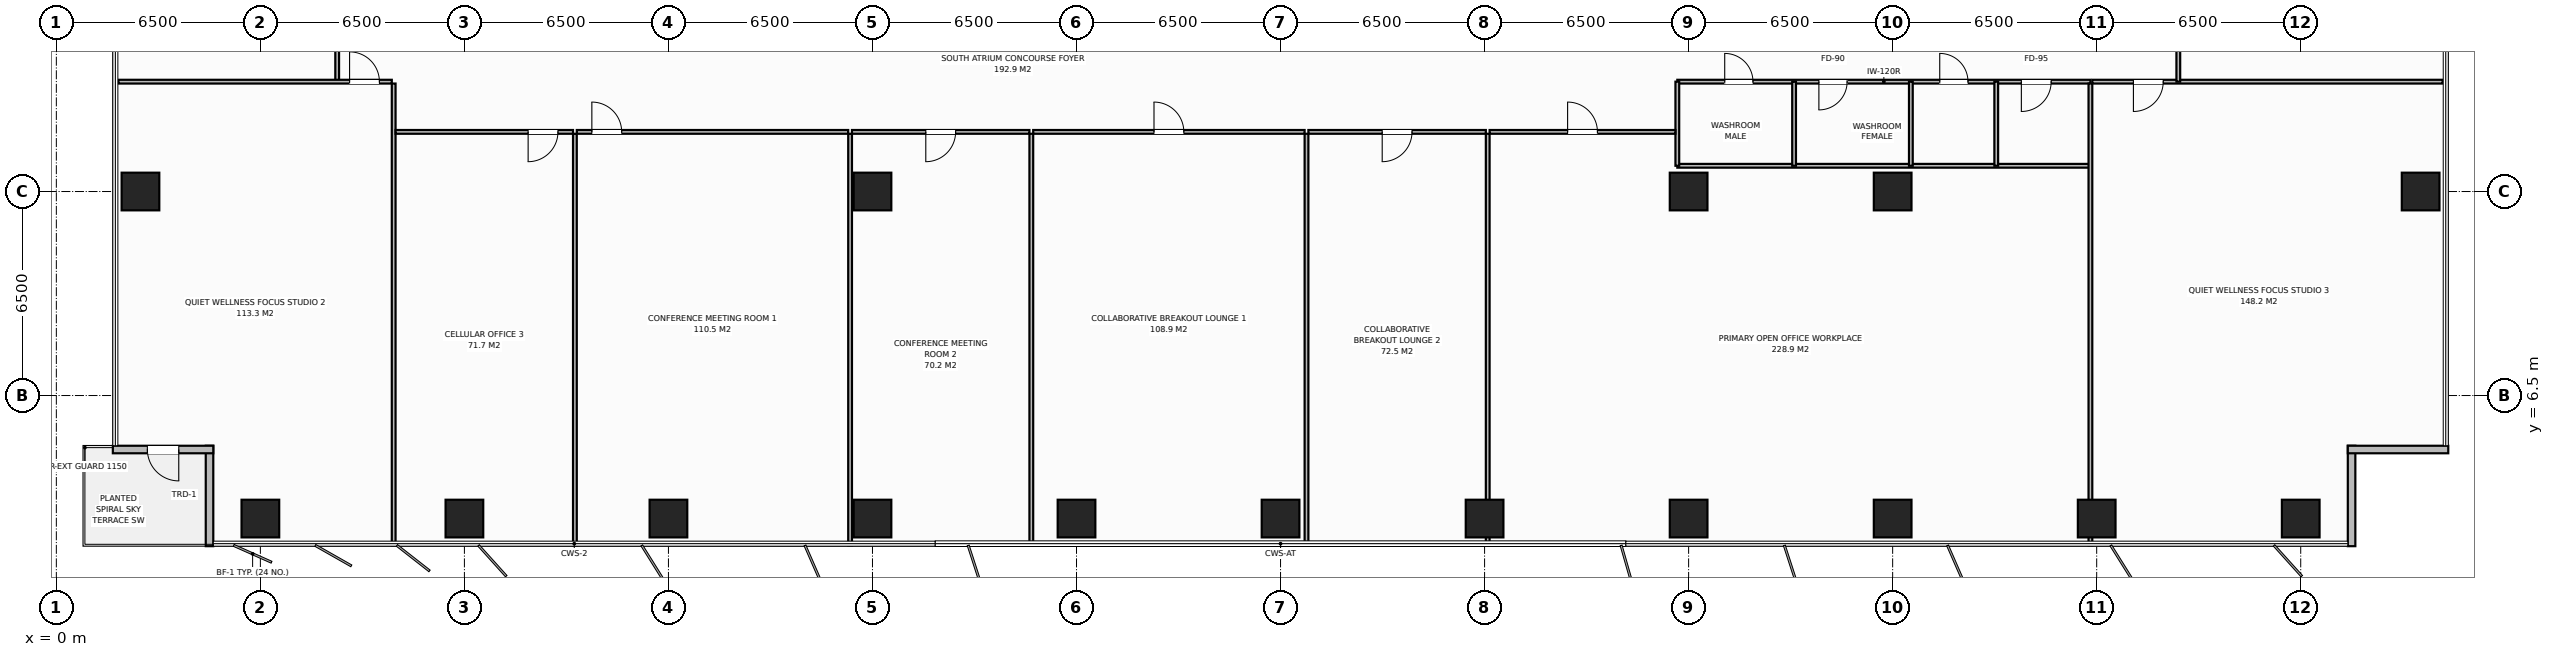
"""IFC4 building model, lengths in metres.
Left out: names, types, materials, properties, quantities, classifications, styles, units other than length and angle.
Written with IfcOpenShell. Run it as: python <this file> out.ifc"""

import sys

from ifc_helpers import new_model, si_unit, direction, frame, frame_2d, origin, origin_2d, place, context, subcontext, project, spatial, rectangle, extrude, element, fill, save


model = new_model("IFC4")
c1 = context("Model", 3, precision=1e-05, world=origin(), true_north=direction((0.0, 1.0)))
c2 = subcontext(c1, "Body", "Model", "MODEL_VIEW")
j1 = project(units=[si_unit("LENGTHUNIT", "METRE"), si_unit("PLANEANGLEUNIT", "RADIAN")], contexts=[c1])
p1 = place(None, origin())
s1 = spatial("IfcSite", under=j1, at=p1, CompositionType="ELEMENT")
p2 = place(p1, origin())
s2 = spatial("IfcBuilding", under=s1, at=p2, CompositionType="ELEMENT")
p3 = place(p2, frame((0.0, 0.0, 93.6)))
s3 = spatial("IfcBuildingStorey", under=s2, at=p3, CompositionType="ELEMENT", Elevation=93.6)
for number, where, z_axis, x_axis in (
    (1, (58.5, 13.0, 0.0), (0.0, 0.0, 1.0), (1.0, 0.0, 0.0)),
    (2, (26.0, 13.0, 0.0), (0.0, 0.0, 1.0), (1.0, 0.0, 0.0)),
    (3, (52.0, 13.0, 0.0), (0.0, 0.0, 1.0), (1.0, 0.0, 0.0)),
    (4, (6.5, 2.58, 0.0), (0.0, 0.0, 1.0), (1.0, 0.0, 0.0)),
    (5, (13.0, 2.58, 0.0), (0.0, 0.0, 1.0), (1.0, 0.0, 0.0)),
    (6, (19.5, 2.58, 0.0), (0.0, 0.0, 1.0), (1.0, 0.0, 0.0)),
    (7, (26.0, 2.58, 0.0), (0.0, 0.0, 1.0), (1.0, 0.0, 0.0)),
    (8, (32.5, 2.58, 0.0), (0.0, 0.0, 1.0), (1.0, 0.0, 0.0)),
    (9, (39.0, 2.58, 0.0), (0.0, 0.0, 1.0), (1.0, 0.0, 0.0)),
    (10, (45.5, 2.58, 0.0), (0.0, 0.0, 1.0), (1.0, 0.0, 0.0)),
    (11, (52.0, 2.58, 0.0), (0.0, 0.0, 1.0), (1.0, 0.0, 0.0)),
    (12, (58.5, 2.58, 0.0), (0.0, 0.0, 1.0), (1.0, 0.0, 0.0)),
    (13, (65.0, 2.58, 0.0), (0.0, 0.0, 1.0), (1.0, 0.0, 0.0)),
    (14, (71.5, 2.58, 0.0), (0.0, 0.0, 1.0), (1.0, 0.0, 0.0)),
    (15, (2.68, 13.0, 0.0), (0.0, 0.0, 1.0), (1.0, 0.0, 0.0)),
    (16, (75.32, 13.0, 0.0), (0.0, 0.0, 1.0), (1.0, 0.0, 0.0)),
):
    element("IfcColumn", number, at=place(p3, frame(where, z_axis=z_axis, x_axis=x_axis)), inside=s3, PredefinedType="COLUMN", context=c2, shape_type="SweptSolid", body=[
        extrude(rectangle(XDim=1.2, YDim=1.2, at=origin_2d()), origin(), (0.0, 0.0, 1.0), 3.8),
    ])
p4 = place(p3, frame((4.88, 1.7, 0.0), z_axis=(0.0, 0.0, 1.0), x_axis=(0.0, 1.0, 0.0)))
e17 = element("IfcWall", 17, at=p4, inside=s3, PredefinedType="STANDARD", context=c2, shape_type="SweptSolid", body=[
    extrude(rectangle(XDim=3.2, YDim=0.24, at=frame_2d((1.6, 0.0))), origin(), (0.0, 0.0, 1.0), 3.565),
])
p5 = place(p3, frame((5.0, 4.78, 0.0), z_axis=(0.0, 0.0, 1.0), x_axis=(-1.0, 0.0, 0.0)))
e18 = element("IfcWall", 18, at=p5, inside=s3, PredefinedType="STANDARD", context=c2, shape_type="SweptSolid", body=[
    extrude(rectangle(XDim=3.2, YDim=0.24, at=frame_2d((1.6, 0.0))), origin(), (0.0, 0.0, 1.0), 3.565),
])
p6 = place(p5, frame((1.1, 0.0, 0.0)))
e19 = element("IfcOpeningElement", 19, at=p6, cuts=e18, PredefinedType="OPENING", context=c2, shape_type="SweptSolid", body=[
    extrude(rectangle(XDim=1.0, YDim=2.2, at=frame_2d((0.5, 1.1))), frame((0.0, 0.13, 0.0), z_axis=(0.0, -1.0, 0.0), x_axis=(1.0, 0.0, 0.0)), (0.0, 0.0, 1.0), 0.26),
])
for number, where, z_axis, x_axis in (
    (20, (73.12, 4.9, 0.0), (0.0, 0.0, 1.0), (0.0, -1.0, 0.0)),
    (21, (76.2, 4.78, 0.0), (0.0, 0.0, 1.0), (-1.0, 0.0, 0.0)),
):
    element("IfcWall", number, at=place(p3, frame(where, z_axis=z_axis, x_axis=x_axis)), inside=s3, PredefinedType="STANDARD", context=c2, shape_type="SweptSolid", body=[
        extrude(rectangle(XDim=3.2, YDim=0.24, at=frame_2d((1.6, 0.0))), origin(), (0.0, 0.0, 1.0), 3.565),
    ])
p7 = place(p3, frame((8.947, 16.5, 0.0), z_axis=(0.0, 0.0, 1.0), x_axis=(0.0, 1.0, 0.0)))
e22 = element("IfcWall", 22, at=p7, inside=s3, PredefinedType="PARTITIONING", context=c2, shape_type="SweptSolid", body=[
    extrude(rectangle(XDim=2.1, YDim=0.12, at=frame_2d((1.05, 0.0))), origin(), (0.0, 0.0, 1.0), 3.565),
])
p8 = place(p3, frame((51.64, 16.5, 0.0), z_axis=(0.0, 0.0, 1.0), x_axis=(1.0, 0.0, 0.0)))
e23 = element("IfcWall", 23, at=p8, inside=s3, PredefinedType="PARTITIONING", context=c2, shape_type="SweptSolid", body=[
    extrude(rectangle(XDim=13.16, YDim=0.12, at=frame_2d((6.58, 0.0))), origin(), (0.0, 0.0, 1.0), 3.565),
])
p9 = place(p8, frame((1.51, 0.0, 0.0)))
e24 = element("IfcOpeningElement", 24, at=p9, cuts=e23, PredefinedType="OPENING", context=c2, shape_type="SweptSolid", body=[
    extrude(rectangle(XDim=0.9, YDim=2.15, at=frame_2d((0.45, 1.075))), frame((0.0, 0.07, 0.0), z_axis=(0.0, -1.0, 0.0), x_axis=(1.0, 0.0, 0.0)), (0.0, 0.0, 1.0), 0.14),
])
p10 = place(p8, frame((4.51, 0.0, 0.0)))
e25 = element("IfcOpeningElement", 25, at=p10, cuts=e23, PredefinedType="OPENING", context=c2, shape_type="SweptSolid", body=[
    extrude(rectangle(XDim=0.9, YDim=2.15, at=frame_2d((0.45, 1.075))), frame((0.0, 0.07, 0.0), z_axis=(0.0, -1.0, 0.0), x_axis=(1.0, 0.0, 0.0)), (0.0, 0.0, 1.0), 0.14),
])
p11 = place(p8, frame((8.36, 0.0, 0.0)))
e26 = element("IfcOpeningElement", 26, at=p11, cuts=e23, PredefinedType="OPENING", context=c2, shape_type="SweptSolid", body=[
    extrude(rectangle(XDim=0.9, YDim=2.15, at=frame_2d((0.45, 1.075))), frame((0.0, 0.07, 0.0), z_axis=(0.0, -1.0, 0.0), x_axis=(1.0, 0.0, 0.0)), (0.0, 0.0, 1.0), 0.14),
])
p12 = place(p8, frame((10.96, 0.0, 0.0)))
e27 = element("IfcOpeningElement", 27, at=p12, cuts=e23, PredefinedType="OPENING", context=c2, shape_type="SweptSolid", body=[
    extrude(rectangle(XDim=0.95, YDim=2.15, at=frame_2d((0.475, 1.075))), frame((0.0, 0.07, 0.0), z_axis=(0.0, -1.0, 0.0), x_axis=(1.0, 0.0, 0.0)), (0.0, 0.0, 1.0), 0.14),
])
p13 = place(p3, frame((51.64, 13.82, 0.0), z_axis=(0.0, 0.0, 1.0), x_axis=(1.0, 0.0, 0.0)))
e28 = element("IfcWall", 28, at=p13, inside=s3, PredefinedType="PARTITIONING", context=c2, shape_type="SweptSolid", body=[
    extrude(rectangle(XDim=13.16, YDim=0.12, at=frame_2d((6.58, 0.0))), origin(), (0.0, 0.0, 1.0), 3.565),
])
for number, where, z_axis, x_axis in (
    (29, (51.64, 13.82, 0.0), (0.0, 0.0, 1.0), (0.0, 1.0, 0.0)),
    (30, (55.36, 13.82, 0.0), (0.0, 0.0, 1.0), (0.0, 1.0, 0.0)),
    (31, (59.08, 13.82, 0.0), (0.0, 0.0, 1.0), (0.0, 1.0, 0.0)),
    (32, (61.8, 13.82, 0.0), (0.0, 0.0, 1.0), (0.0, 1.0, 0.0)),
):
    element("IfcWall", number, at=place(p3, frame(where, z_axis=z_axis, x_axis=x_axis)), inside=s3, PredefinedType="PARTITIONING", context=c2, shape_type="SweptSolid", body=[
        extrude(rectangle(XDim=2.68, YDim=0.12, at=frame_2d((1.34, 0.0))), origin(), (0.0, 0.0, 1.0), 3.565),
    ])
p14 = place(p3, frame((10.747, 1.72, 0.0), z_axis=(0.0, 0.0, 1.0), x_axis=(0.0, 1.0, 0.0)))
e33 = element("IfcWall", 33, at=p14, inside=s3, PredefinedType="PARTITIONING", context=c2, shape_type="SweptSolid", body=[
    extrude(rectangle(XDim=14.72, YDim=0.12, at=frame_2d((7.36, 0.0))), origin(), (0.0, 0.0, 1.0), 3.565),
])
p15 = place(p3, frame((1.98, 16.5, 0.0), z_axis=(0.0, 0.0, 1.0), x_axis=(1.0, 0.0, 0.0)))
e34 = element("IfcWall", 34, at=p15, inside=s3, PredefinedType="PARTITIONING", context=c2, shape_type="SweptSolid", body=[
    extrude(rectangle(XDim=8.707, YDim=0.12, at=frame_2d((4.354, 0.0))), origin(), (0.0, 0.0, 1.0), 3.565),
])
p16 = place(p15, frame((7.362, 0.0, 0.0)))
e35 = element("IfcOpeningElement", 35, at=p16, cuts=e34, PredefinedType="OPENING", context=c2, shape_type="SweptSolid", body=[
    extrude(rectangle(XDim=0.95, YDim=2.15, at=frame_2d((0.475, 1.075))), frame((0.0, 0.07, 0.0), z_axis=(0.0, -1.0, 0.0), x_axis=(1.0, 0.0, 0.0)), (0.0, 0.0, 1.0), 0.14),
])
p17 = place(p3, frame((16.52, 1.72, 0.0), z_axis=(0.0, 0.0, 1.0), x_axis=(0.0, 1.0, 0.0)))
e36 = element("IfcWall", 36, at=p17, inside=s3, PredefinedType="PARTITIONING", context=c2, shape_type="SweptSolid", body=[
    extrude(rectangle(XDim=13.12, YDim=0.12, at=frame_2d((6.56, 0.0))), origin(), (0.0, 0.0, 1.0), 3.565),
])
p18 = place(p3, frame((10.807, 14.9, 0.0), z_axis=(0.0, 0.0, 1.0), x_axis=(1.0, 0.0, 0.0)))
e37 = element("IfcWall", 37, at=p18, inside=s3, PredefinedType="PARTITIONING", context=c2, shape_type="SweptSolid", body=[
    extrude(rectangle(XDim=5.653, YDim=0.12, at=frame_2d((2.827, 0.0))), origin(), (0.0, 0.0, 1.0), 3.565),
])
p19 = place(p18, frame((4.223, 0.0, 0.0)))
e38 = element("IfcOpeningElement", 38, at=p19, cuts=e37, PredefinedType="OPENING", context=c2, shape_type="SweptSolid", body=[
    extrude(rectangle(XDim=0.95, YDim=2.15, at=frame_2d((0.475, 1.075))), frame((0.0, 0.07, 0.0), z_axis=(0.0, -1.0, 0.0), x_axis=(1.0, 0.0, 0.0)), (0.0, 0.0, 1.0), 0.14),
])
p20 = place(p3, frame((25.287, 1.72, 0.0), z_axis=(0.0, 0.0, 1.0), x_axis=(0.0, 1.0, 0.0)))
e39 = element("IfcWall", 39, at=p20, inside=s3, PredefinedType="PARTITIONING", context=c2, shape_type="SweptSolid", body=[
    extrude(rectangle(XDim=13.12, YDim=0.12, at=frame_2d((6.56, 0.0))), origin(), (0.0, 0.0, 1.0), 3.565),
])
p21 = place(p3, frame((16.58, 14.9, 0.0), z_axis=(0.0, 0.0, 1.0), x_axis=(1.0, 0.0, 0.0)))
e40 = element("IfcWall", 40, at=p21, inside=s3, PredefinedType="PARTITIONING", context=c2, shape_type="SweptSolid", body=[
    extrude(rectangle(XDim=8.647, YDim=0.12, at=frame_2d((4.323, 0.0))), origin(), (0.0, 0.0, 1.0), 3.565),
])
p22 = place(p21, frame((0.48, 0.0, 0.0)))
e41 = element("IfcOpeningElement", 41, at=p22, cuts=e40, PredefinedType="OPENING", context=c2, shape_type="SweptSolid", body=[
    extrude(rectangle(XDim=0.95, YDim=2.15, at=frame_2d((0.475, 1.075))), frame((0.0, 0.07, 0.0), z_axis=(0.0, -1.0, 0.0), x_axis=(1.0, 0.0, 0.0)), (0.0, 0.0, 1.0), 0.14),
])
p23 = place(p3, frame((31.06, 1.72, 0.0), z_axis=(0.0, 0.0, 1.0), x_axis=(0.0, 1.0, 0.0)))
e42 = element("IfcWall", 42, at=p23, inside=s3, PredefinedType="PARTITIONING", context=c2, shape_type="SweptSolid", body=[
    extrude(rectangle(XDim=13.12, YDim=0.12, at=frame_2d((6.56, 0.0))), origin(), (0.0, 0.0, 1.0), 3.565),
])
p24 = place(p3, frame((25.347, 14.9, 0.0), z_axis=(0.0, 0.0, 1.0), x_axis=(1.0, 0.0, 0.0)))
e43 = element("IfcWall", 43, at=p24, inside=s3, PredefinedType="PARTITIONING", context=c2, shape_type="SweptSolid", body=[
    extrude(rectangle(XDim=5.653, YDim=0.12, at=frame_2d((2.827, 0.0))), origin(), (0.0, 0.0, 1.0), 3.565),
])
p25 = place(p24, frame((2.352, 0.0, 0.0)))
e44 = element("IfcOpeningElement", 44, at=p25, cuts=e43, PredefinedType="OPENING", context=c2, shape_type="SweptSolid", body=[
    extrude(rectangle(XDim=0.95, YDim=2.15, at=frame_2d((0.475, 1.075))), frame((0.0, 0.07, 0.0), z_axis=(0.0, -1.0, 0.0), x_axis=(1.0, 0.0, 0.0)), (0.0, 0.0, 1.0), 0.14),
])
p26 = place(p3, frame((39.827, 1.72, 0.0), z_axis=(0.0, 0.0, 1.0), x_axis=(0.0, 1.0, 0.0)))
e45 = element("IfcWall", 45, at=p26, inside=s3, PredefinedType="PARTITIONING", context=c2, shape_type="SweptSolid", body=[
    extrude(rectangle(XDim=13.12, YDim=0.12, at=frame_2d((6.56, 0.0))), origin(), (0.0, 0.0, 1.0), 3.565),
])
p27 = place(p3, frame((31.12, 14.9, 0.0), z_axis=(0.0, 0.0, 1.0), x_axis=(1.0, 0.0, 0.0)))
e46 = element("IfcWall", 46, at=p27, inside=s3, PredefinedType="PARTITIONING", context=c2, shape_type="SweptSolid", body=[
    extrude(rectangle(XDim=8.647, YDim=0.12, at=frame_2d((4.323, 0.0))), origin(), (0.0, 0.0, 1.0), 3.565),
])
p28 = place(p27, frame((3.848, 0.0, 0.0)))
e47 = element("IfcOpeningElement", 47, at=p28, cuts=e46, PredefinedType="OPENING", context=c2, shape_type="SweptSolid", body=[
    extrude(rectangle(XDim=0.95, YDim=2.15, at=frame_2d((0.475, 1.075))), frame((0.0, 0.07, 0.0), z_axis=(0.0, -1.0, 0.0), x_axis=(1.0, 0.0, 0.0)), (0.0, 0.0, 1.0), 0.14),
])
p29 = place(p3, frame((45.6, 1.72, 0.0), z_axis=(0.0, 0.0, 1.0), x_axis=(0.0, 1.0, 0.0)))
e48 = element("IfcWall", 48, at=p29, inside=s3, PredefinedType="PARTITIONING", context=c2, shape_type="SweptSolid", body=[
    extrude(rectangle(XDim=13.12, YDim=0.12, at=frame_2d((6.56, 0.0))), origin(), (0.0, 0.0, 1.0), 2.965),
])
p30 = place(p3, frame((39.887, 14.9, 0.0), z_axis=(0.0, 0.0, 1.0), x_axis=(1.0, 0.0, 0.0)))
e49 = element("IfcWall", 49, at=p30, inside=s3, PredefinedType="PARTITIONING", context=c2, shape_type="SweptSolid", body=[
    extrude(rectangle(XDim=5.653, YDim=0.12, at=frame_2d((2.827, 0.0))), origin(), (0.0, 0.0, 1.0), 3.565),
])
p31 = place(p30, frame((2.352, 0.0, 0.0)))
e50 = element("IfcOpeningElement", 50, at=p31, cuts=e49, PredefinedType="OPENING", context=c2, shape_type="SweptSolid", body=[
    extrude(rectangle(XDim=0.95, YDim=2.15, at=frame_2d((0.475, 1.075))), frame((0.0, 0.07, 0.0), z_axis=(0.0, -1.0, 0.0), x_axis=(1.0, 0.0, 0.0)), (0.0, 0.0, 1.0), 0.14),
])
p32 = place(p3, frame((64.8, 1.72, 0.0), z_axis=(0.0, 0.0, 1.0), x_axis=(0.0, 1.0, 0.0)))
e51 = element("IfcWall", 51, at=p32, inside=s3, PredefinedType="PARTITIONING", context=c2, shape_type="SweptSolid", body=[
    extrude(rectangle(XDim=14.72, YDim=0.12, at=frame_2d((7.36, 0.0))), origin(), (0.0, 0.0, 1.0), 2.965),
])
p33 = place(p3, frame((45.66, 14.9, 0.0), z_axis=(0.0, 0.0, 1.0), x_axis=(1.0, 0.0, 0.0)))
e52 = element("IfcWall", 52, at=p33, inside=s3, PredefinedType="PARTITIONING", context=c2, shape_type="SweptSolid", body=[
    extrude(rectangle(XDim=5.92, YDim=0.12, at=frame_2d((2.96, 0.0))), origin(), (0.0, 0.0, 1.0), 3.565),
])
p34 = place(p33, frame((2.485, 0.0, 0.0)))
e53 = element("IfcOpeningElement", 53, at=p34, cuts=e52, PredefinedType="OPENING", context=c2, shape_type="SweptSolid", body=[
    extrude(rectangle(XDim=0.95, YDim=2.15, at=frame_2d((0.475, 1.075))), frame((0.0, 0.07, 0.0), z_axis=(0.0, -1.0, 0.0), x_axis=(1.0, 0.0, 0.0)), (0.0, 0.0, 1.0), 0.14),
])
p35 = place(p3, frame((64.86, 16.5, 0.0), z_axis=(0.0, 0.0, 1.0), x_axis=(1.0, 0.0, 0.0)))
e54 = element("IfcWall", 54, at=p35, inside=s3, PredefinedType="PARTITIONING", context=c2, shape_type="SweptSolid", body=[
    extrude(rectangle(XDim=11.16, YDim=0.12, at=frame_2d((5.58, 0.0))), origin(), (0.0, 0.0, 1.0), 3.565),
])
p36 = place(p35, frame((1.31, 0.0, 0.0)))
e55 = element("IfcOpeningElement", 55, at=p36, cuts=e54, PredefinedType="OPENING", context=c2, shape_type="SweptSolid", body=[
    extrude(rectangle(XDim=0.95, YDim=2.15, at=frame_2d((0.475, 1.075))), frame((0.0, 0.07, 0.0), z_axis=(0.0, -1.0, 0.0), x_axis=(1.0, 0.0, 0.0)), (0.0, 0.0, 1.0), 0.14),
])
p37 = place(p3, frame((67.6, 16.5, 0.0), z_axis=(0.0, 0.0, 1.0), x_axis=(0.0, 1.0, 0.0)))
e56 = element("IfcWall", 56, at=p37, inside=s3, PredefinedType="PARTITIONING", context=c2, shape_type="SweptSolid", body=[
    extrude(rectangle(XDim=9.5, YDim=0.12, at=frame_2d((4.75, 0.0))), origin(), (0.0, 0.0, 1.0), 3.565),
])
p38 = place(p37, frame((5.325, 0.0, 0.0)))
e57 = element("IfcOpeningElement", 57, at=p38, cuts=e56, PredefinedType="OPENING", context=c2, shape_type="SweptSolid", body=[
    extrude(rectangle(XDim=0.95, YDim=2.15, at=frame_2d((0.475, 1.075))), frame((0.0, 0.07, 0.0), z_axis=(0.0, -1.0, 0.0), x_axis=(1.0, 0.0, 0.0)), (0.0, 0.0, 1.0), 0.14),
])
p39 = place(p6, origin())
e58 = element("IfcDoor", 58, at=p39, inside=s3, OperationType="SINGLE_SWING_LEFT", PredefinedType="DOOR", context=c2, shape_type="SweptSolid", body=[
    extrude(rectangle(XDim=1.0, YDim=2.2, at=frame_2d((0.5, 1.1))), frame((0.0, 0.025, 0.0), z_axis=(0.0, -1.0, 0.0), x_axis=(1.0, 0.0, 0.0)), (0.0, 0.0, 1.0), 0.05),
])
fill(e19, e58)
p40 = place(p9, origin())
e59 = element("IfcDoor", 59, at=p40, inside=s3, OperationType="SINGLE_SWING_LEFT", PredefinedType="DOOR", context=c2, shape_type="SweptSolid", body=[
    extrude(rectangle(XDim=0.9, YDim=2.15, at=frame_2d((0.45, 1.075))), frame((0.0, 0.025, 0.0), z_axis=(0.0, -1.0, 0.0), x_axis=(1.0, 0.0, 0.0)), (0.0, 0.0, 1.0), 0.05),
])
fill(e24, e59)
p41 = place(p10, origin())
e60 = element("IfcDoor", 60, at=p41, inside=s3, OperationType="SINGLE_SWING_RIGHT", PredefinedType="DOOR", context=c2, shape_type="SweptSolid", body=[
    extrude(rectangle(XDim=0.9, YDim=2.15, at=frame_2d((0.45, 1.075))), frame((0.0, 0.025, 0.0), z_axis=(0.0, -1.0, 0.0), x_axis=(1.0, 0.0, 0.0)), (0.0, 0.0, 1.0), 0.05),
])
fill(e25, e60)
p42 = place(p11, origin())
e61 = element("IfcDoor", 61, at=p42, inside=s3, OperationType="SINGLE_SWING_LEFT", PredefinedType="DOOR", context=c2, shape_type="SweptSolid", body=[
    extrude(rectangle(XDim=0.9, YDim=2.15, at=frame_2d((0.45, 1.075))), frame((0.0, 0.025, 0.0), z_axis=(0.0, -1.0, 0.0), x_axis=(1.0, 0.0, 0.0)), (0.0, 0.0, 1.0), 0.05),
])
fill(e26, e61)
p43 = place(p12, origin())
e62 = element("IfcDoor", 62, at=p43, inside=s3, OperationType="SINGLE_SWING_RIGHT", PredefinedType="DOOR", context=c2, shape_type="SweptSolid", body=[
    extrude(rectangle(XDim=0.95, YDim=2.15, at=frame_2d((0.475, 1.075))), frame((0.0, 0.025, 0.0), z_axis=(0.0, -1.0, 0.0), x_axis=(1.0, 0.0, 0.0)), (0.0, 0.0, 1.0), 0.05),
])
fill(e27, e62)
p44 = place(p16, origin())
e63 = element("IfcDoor", 63, at=p44, inside=s3, OperationType="SINGLE_SWING_LEFT", PredefinedType="DOOR", context=c2, shape_type="SweptSolid", body=[
    extrude(rectangle(XDim=0.95, YDim=2.15, at=frame_2d((0.475, 1.075))), frame((0.0, 0.025, 0.0), z_axis=(0.0, -1.0, 0.0), x_axis=(1.0, 0.0, 0.0)), (0.0, 0.0, 1.0), 0.05),
])
fill(e35, e63)
p45 = place(p19, origin())
e64 = element("IfcDoor", 64, at=p45, inside=s3, OperationType="SINGLE_SWING_RIGHT", PredefinedType="DOOR", context=c2, shape_type="SweptSolid", body=[
    extrude(rectangle(XDim=0.95, YDim=2.15, at=frame_2d((0.475, 1.075))), frame((0.0, 0.025, 0.0), z_axis=(0.0, -1.0, 0.0), x_axis=(1.0, 0.0, 0.0)), (0.0, 0.0, 1.0), 0.05),
])
fill(e38, e64)
p46 = place(p22, origin())
e65 = element("IfcDoor", 65, at=p46, inside=s3, OperationType="SINGLE_SWING_LEFT", PredefinedType="DOOR", context=c2, shape_type="SweptSolid", body=[
    extrude(rectangle(XDim=0.95, YDim=2.15, at=frame_2d((0.475, 1.075))), frame((0.0, 0.025, 0.0), z_axis=(0.0, -1.0, 0.0), x_axis=(1.0, 0.0, 0.0)), (0.0, 0.0, 1.0), 0.05),
])
fill(e41, e65)
p47 = place(p25, origin())
e66 = element("IfcDoor", 66, at=p47, inside=s3, OperationType="SINGLE_SWING_RIGHT", PredefinedType="DOOR", context=c2, shape_type="SweptSolid", body=[
    extrude(rectangle(XDim=0.95, YDim=2.15, at=frame_2d((0.475, 1.075))), frame((0.0, 0.025, 0.0), z_axis=(0.0, -1.0, 0.0), x_axis=(1.0, 0.0, 0.0)), (0.0, 0.0, 1.0), 0.05),
])
fill(e44, e66)
p48 = place(p28, origin())
e67 = element("IfcDoor", 67, at=p48, inside=s3, OperationType="SINGLE_SWING_LEFT", PredefinedType="DOOR", context=c2, shape_type="SweptSolid", body=[
    extrude(rectangle(XDim=0.95, YDim=2.15, at=frame_2d((0.475, 1.075))), frame((0.0, 0.025, 0.0), z_axis=(0.0, -1.0, 0.0), x_axis=(1.0, 0.0, 0.0)), (0.0, 0.0, 1.0), 0.05),
])
fill(e47, e67)
p49 = place(p31, origin())
e68 = element("IfcDoor", 68, at=p49, inside=s3, OperationType="SINGLE_SWING_RIGHT", PredefinedType="DOOR", context=c2, shape_type="SweptSolid", body=[
    extrude(rectangle(XDim=0.95, YDim=2.15, at=frame_2d((0.475, 1.075))), frame((0.0, 0.025, 0.0), z_axis=(0.0, -1.0, 0.0), x_axis=(1.0, 0.0, 0.0)), (0.0, 0.0, 1.0), 0.05),
])
fill(e50, e68)
p50 = place(p34, origin())
e69 = element("IfcDoor", 69, at=p50, inside=s3, OperationType="SINGLE_SWING_LEFT", PredefinedType="DOOR", context=c2, shape_type="SweptSolid", body=[
    extrude(rectangle(XDim=0.95, YDim=2.15, at=frame_2d((0.475, 1.075))), frame((0.0, 0.025, 0.0), z_axis=(0.0, -1.0, 0.0), x_axis=(1.0, 0.0, 0.0)), (0.0, 0.0, 1.0), 0.05),
])
fill(e53, e69)
p51 = place(p36, origin())
e70 = element("IfcDoor", 70, at=p51, inside=s3, OperationType="SINGLE_SWING_RIGHT", PredefinedType="DOOR", context=c2, shape_type="SweptSolid", body=[
    extrude(rectangle(XDim=0.95, YDim=2.15, at=frame_2d((0.475, 1.075))), frame((0.0, 0.025, 0.0), z_axis=(0.0, -1.0, 0.0), x_axis=(1.0, 0.0, 0.0)), (0.0, 0.0, 1.0), 0.05),
])
fill(e55, e70)
save(model, sys.argv[1])
